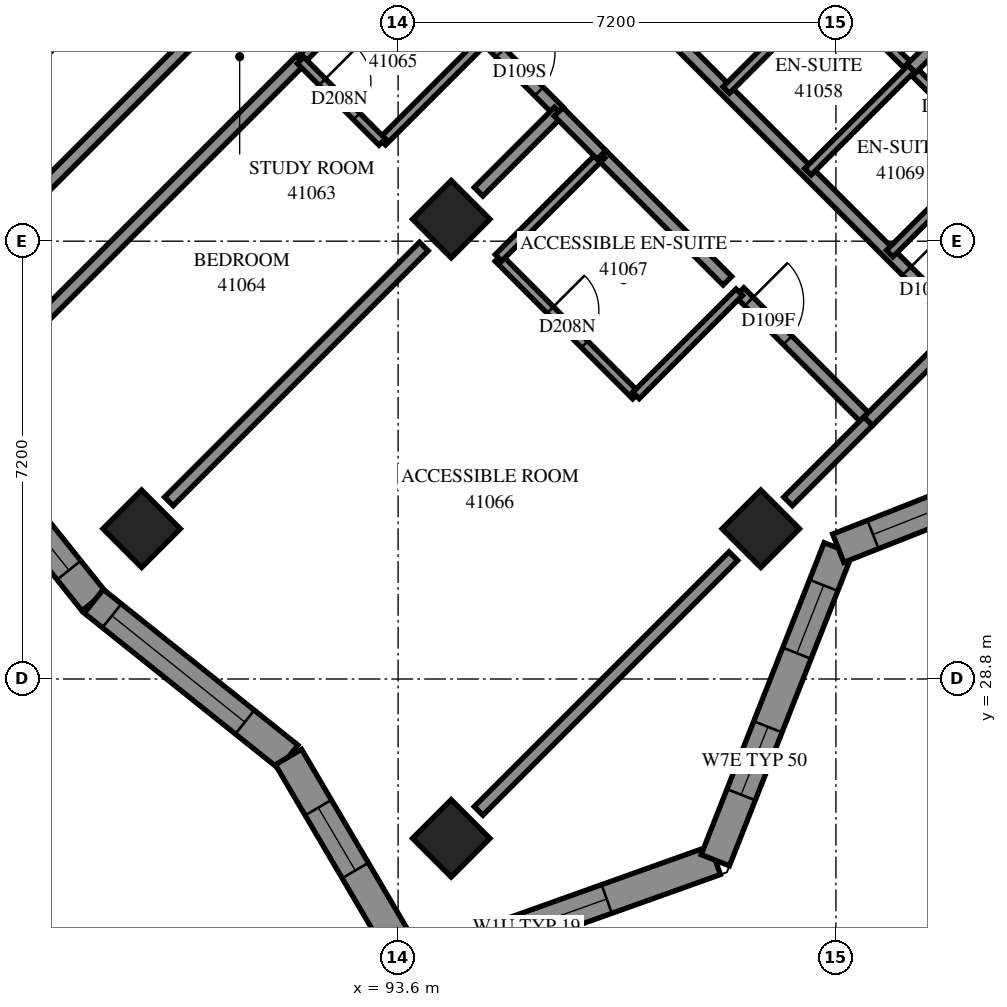
"""IFC4 building model, lengths in metres.
Left out: names, types, materials, properties, quantities, classifications, styles, units other than length and angle.
Written with IfcOpenShell. Run it as: python <this file> out.ifc"""

import sys

from ifc_helpers import new_model, si_unit, direction, frame, frame_2d, origin, origin_2d, place, context, subcontext, project, spatial, polyline, rectangle, outline, extrude, element, fill, save


model = new_model("IFC4")
c1 = context("Model", 3, precision=1e-05, world=origin(), true_north=direction((0.0, 1.0)))
c2 = subcontext(c1, "Body", "Model", "MODEL_VIEW")
j1 = project(units=[si_unit("LENGTHUNIT", "METRE"), si_unit("PLANEANGLEUNIT", "RADIAN")], contexts=[c1])
p1 = place(None, origin())
s1 = spatial("IfcSite", under=j1, at=p1, CompositionType="ELEMENT")
p2 = place(p1, origin())
s2 = spatial("IfcBuilding", under=s1, at=p2, CompositionType="ELEMENT")
p3 = place(p2, frame((0.0, 0.0, 152.4)))
s3 = spatial("IfcBuildingStorey", under=s2, at=p3, CompositionType="ELEMENT", Elevation=152.4)
for number, where, z_axis, x_axis in (
    (1, (94.474, 36.362, 0.0), (0.0, 0.0, 1.0), (0.707, -0.707, 0.0)),
    (2, (89.382, 31.271, 0.0), (0.0, 0.0, 1.0), (0.707, -0.707, 0.0)),
    (3, (99.565, 31.271, 0.0), (0.0, 0.0, 1.0), (0.707, -0.707, 0.0)),
    (4, (94.474, 26.18, 0.0), (0.0, 0.0, 1.0), (0.707, -0.707, 0.0)),
):
    element("IfcColumn", number, at=place(p3, frame(where, z_axis=z_axis, x_axis=x_axis)), inside=s3, PredefinedType="COLUMN", context=c2, shape_type="SweptSolid", body=[
        extrude(rectangle(XDim=0.9, YDim=0.9, at=origin_2d()), origin(), (0.0, 0.0, 1.0), 3.1),
    ])
p4 = place(p3, frame((87.049, 38.695, -0.3), z_axis=(0.0, 0.0, 1.0), x_axis=(0.7071067812, 0.7071067812, 0.0)))
e5 = element("IfcWall", 5, at=p4, inside=s3, PredefinedType="SHEAR", context=c2, shape_type="SweptSolid", body=[
    extrude(rectangle(XDim=14.4, YDim=0.6, at=frame_2d((7.2, 0.0))), origin(), (0.0, 0.0, 1.0), 2.7),
])
p5 = place(p4, frame((4.55, 0.0, 0.3)))
e6 = element("IfcOpeningElement", 6, at=p5, cuts=e5, PredefinedType="OPENING", context=c2, shape_type="SweptSolid", body=[
    extrude(rectangle(XDim=1.1, YDim=2.1, at=frame_2d((0.55, 1.05))), frame((0.0, 0.31, 0.0), z_axis=(0.0, -1.0, 0.0), x_axis=(1.0, 0.0, 0.0)), (0.0, 0.0, 1.0), 0.62),
])
p6 = place(p4, frame((11.35, 0.0, 0.3)))
e7 = element("IfcOpeningElement", 7, at=p6, cuts=e5, PredefinedType="OPENING", context=c2, shape_type="SweptSolid", body=[
    extrude(rectangle(XDim=1.1, YDim=2.1, at=frame_2d((0.55, 1.05))), frame((0.0, 0.31, 0.0), z_axis=(0.0, -1.0, 0.0), x_axis=(1.0, 0.0, 0.0)), (0.0, 0.0, 1.0), 0.62),
])
p7 = place(p3, frame((93.841, 24.044, 0.0), z_axis=(0.0, 0.0, 1.0), x_axis=(0.9418395195, 0.3360629696, 0.0)))
e8 = element("IfcWall", 8, at=p7, inside=s3, PredefinedType="SOLIDWALL", context=c2, shape_type="SweptSolid", body=[
    extrude(outline(polyline([(-0.207, -0.25), (5.396, -0.25), (5.169, 0.25), (0.207, 0.25), (-0.207, -0.25)])), origin(), (0.0, 0.0, 1.0), 3.1),
])
p8 = place(p7, frame((0.587, 0.0, 0.45)))
e9 = element("IfcOpeningElement", 9, at=p8, cuts=e8, PredefinedType="OPENING", context=c2, shape_type="SweptSolid", body=[
    extrude(rectangle(XDim=2.8, YDim=2.5, at=frame_2d((1.4, 1.25))), frame((0.0, 0.26, 0.0), z_axis=(0.0, -1.0, 0.0), x_axis=(1.0, 0.0, 0.0)), (0.0, 0.0, 1.0), 0.52),
])
p9 = place(p3, frame((98.816, 25.819, 0.0), z_axis=(0.0, 0.0, 1.0), x_axis=(0.3666966918, 0.9303405485, 0.0)))
e10 = element("IfcWall", 10, at=p9, inside=s3, PredefinedType="SOLIDWALL", context=c2, shape_type="SweptSolid", body=[
    extrude(outline(polyline([(-0.114, -0.25), (5.407, -0.25), (5.624, 0.25), (0.114, 0.25), (-0.114, -0.25)])), origin(), (0.0, 0.0, 1.0), 3.1),
])
p10 = place(p9, frame((1.159, 0.0, 0.45)))
e11 = element("IfcOpeningElement", 11, at=p10, cuts=e10, PredefinedType="OPENING", context=c2, shape_type="SweptSolid", body=[
    extrude(rectangle(XDim=1.2, YDim=2.5, at=frame_2d((0.6, 1.25))), frame((0.0, 0.26, 0.0), z_axis=(0.0, -1.0, 0.0), x_axis=(1.0, 0.0, 0.0)), (0.0, 0.0, 1.0), 0.52),
])
p11 = place(p9, frame((3.659, 0.0, 0.45)))
e12 = element("IfcOpeningElement", 12, at=p11, cuts=e10, PredefinedType="OPENING", context=c2, shape_type="SweptSolid", body=[
    extrude(rectangle(XDim=1.2, YDim=2.5, at=frame_2d((0.6, 1.25))), frame((0.0, 0.26, 0.0), z_axis=(0.0, -1.0, 0.0), x_axis=(1.0, 0.0, 0.0)), (0.0, 0.0, 1.0), 0.52),
])
p12 = place(p3, frame((100.839, 30.95, 0.0), z_axis=(0.0, 0.0, 1.0), x_axis=(0.9303343627, 0.3667123852, 0.0)))
e13 = element("IfcWall", 13, at=p12, inside=s3, PredefinedType="SOLIDWALL", context=c2, shape_type="SweptSolid", body=[
    extrude(outline(polyline([(0.109, -0.25), (5.629, -0.25), (5.402, 0.25), (-0.109, 0.25), (0.109, -0.25)])), origin(), (0.0, 0.0, 1.0), 3.1),
])
p13 = place(p12, frame((0.614, 0.0, 0.45)))
e14 = element("IfcOpeningElement", 14, at=p13, cuts=e13, PredefinedType="OPENING", context=c2, shape_type="SweptSolid", body=[
    extrude(rectangle(XDim=2.8, YDim=2.5, at=frame_2d((1.4, 1.25))), frame((0.0, 0.26, 0.0), z_axis=(0.0, -1.0, 0.0), x_axis=(1.0, 0.0, 0.0)), (0.0, 0.0, 1.0), 0.52),
])
p14 = place(p3, frame((86.046, 33.265, 0.0), z_axis=(0.0, 0.0, 1.0), x_axis=(0.6246412623, -0.7809118346, 0.0)))
e15 = element("IfcWall", 15, at=p14, inside=s3, PredefinedType="SOLIDWALL", context=c2, shape_type="SweptSolid", body=[
    extrude(outline(polyline([(0.028, -0.25), (4.109, -0.25), (4.054, 0.25), (-0.028, 0.25), (0.028, -0.25)])), origin(), (0.0, 0.0, 1.0), 3.1),
])
p15 = place(p14, frame((0.627, 0.0, 0.45)))
e16 = element("IfcOpeningElement", 16, at=p15, cuts=e15, PredefinedType="OPENING", context=c2, shape_type="SweptSolid", body=[
    extrude(rectangle(XDim=2.8, YDim=2.5, at=frame_2d((1.4, 1.25))), frame((0.0, 0.26, 0.0), z_axis=(0.0, -1.0, 0.0), x_axis=(1.0, 0.0, 0.0)), (0.0, 0.0, 1.0), 0.52),
])
p16 = place(p3, frame((88.596, 30.078, 0.0), z_axis=(0.0, 0.0, 1.0), x_axis=(0.7809068844, -0.6246474509, 0.0)))
e17 = element("IfcWall", 17, at=p16, inside=s3, PredefinedType="SOLIDWALL", context=c2, shape_type="SweptSolid", body=[
    extrude(outline(polyline([(-0.028, -0.25), (4.054, -0.25), (4.146, 0.25), (0.028, 0.25), (-0.028, -0.25)])), origin(), (0.0, 0.0, 1.0), 3.1),
])
p17 = place(p16, frame((0.381, 0.0, 0.45)))
e18 = element("IfcOpeningElement", 18, at=p17, cuts=e17, PredefinedType="OPENING", context=c2, shape_type="SweptSolid", body=[
    extrude(rectangle(XDim=2.8, YDim=2.5, at=frame_2d((1.4, 1.25))), frame((0.0, 0.26, 0.0), z_axis=(0.0, -1.0, 0.0), x_axis=(1.0, 0.0, 0.0)), (0.0, 0.0, 1.0), 0.52),
])
p18 = place(p3, frame((91.797, 27.517, 0.0), z_axis=(0.0, 0.0, 1.0), x_axis=(0.5071491729, -0.8618582925, 0.0)))
e19 = element("IfcWall", 19, at=p18, inside=s3, PredefinedType="SOLIDWALL", context=c2, shape_type="SweptSolid", body=[
    extrude(outline(polyline([(0.046, -0.25), (4.236, -0.25), (3.823, 0.25), (-0.046, 0.25), (0.046, -0.25)])), origin(), (0.0, 0.0, 1.0), 3.1),
])
p19 = place(p18, frame((0.966, 0.0, 0.45)))
e20 = element("IfcOpeningElement", 20, at=p19, cuts=e19, PredefinedType="OPENING", context=c2, shape_type="SweptSolid", body=[
    extrude(rectangle(XDim=1.2, YDim=2.5, at=frame_2d((0.6, 1.25))), frame((0.0, 0.26, 0.0), z_axis=(0.0, -1.0, 0.0), x_axis=(1.0, 0.0, 0.0)), (0.0, 0.0, 1.0), 0.52),
])
p20 = place(p3, frame((94.189, 43.287, 0.0), z_axis=(0.0, 0.0, 1.0), x_axis=(0.7071067812, -0.7071067812, 0.0)))
e21 = element("IfcWall", 21, at=p20, inside=s3, PredefinedType="PARTITIONING", context=c2, shape_type="SweptSolid", body=[
    extrude(rectangle(XDim=12.298, YDim=0.2, at=frame_2d((6.149, 0.0))), origin(), (0.0, 0.0, 1.0), 3.1),
])
p21 = place(p20, frame((3.755, 0.0, 0.0)))
e22 = element("IfcOpeningElement", 22, at=p21, cuts=e21, PredefinedType="OPENING", context=c2, shape_type="SweptSolid", body=[
    extrude(rectangle(XDim=0.9, YDim=2.1, at=frame_2d((0.45, 1.05))), frame((0.0, 0.11, 0.0), z_axis=(0.0, -1.0, 0.0), x_axis=(1.0, 0.0, 0.0)), (0.0, 0.0, 1.0), 0.22),
])
p22 = place(p20, frame((10.998, 0.0, 0.0)))
e23 = element("IfcOpeningElement", 23, at=p22, cuts=e21, PredefinedType="OPENING", context=c2, shape_type="SweptSolid", body=[
    extrude(rectangle(XDim=0.9, YDim=2.1, at=frame_2d((0.45, 1.05))), frame((0.0, 0.11, 0.0), z_axis=(0.0, -1.0, 0.0), x_axis=(1.0, 0.0, 0.0)), (0.0, 0.0, 1.0), 0.22),
])
p23 = place(p3, frame((86.836, 35.938, 0.0), z_axis=(0.0, 0.0, 1.0), x_axis=(0.7071067812, 0.7071067812, 0.0)))
e24 = element("IfcWall", 24, at=p23, inside=s3, PredefinedType="PARTITIONING", context=c2, shape_type="SweptSolid", body=[
    extrude(rectangle(XDim=8.2, YDim=0.2, at=frame_2d((4.1, 0.0))), origin(), (0.0, 0.0, 1.0), 3.1),
])
p24 = place(p3, frame((86.33, 33.311, 0.0), z_axis=(0.0, 0.0, 1.0), x_axis=(0.707100543, 0.7071130194, 0.0)))
e25 = element("IfcWall", 25, at=p24, inside=s3, PredefinedType="PARTITIONING", context=c2, shape_type="SweptSolid", body=[
    extrude(rectangle(XDim=8.015, YDim=0.2, at=frame_2d((4.008, 0.0))), origin(), (0.0, 0.0, 1.0), 3.1),
])
p25 = place(p3, frame((89.831, 31.721, 0.0), z_axis=(0.0, 0.0, 1.0), x_axis=(0.7071067812, 0.7071067812, 0.0)))
e26 = element("IfcWall", 26, at=p25, inside=s3, PredefinedType="PARTITIONING", context=c2, shape_type="SweptSolid", body=[
    extrude(rectangle(XDim=5.928, YDim=0.2, at=frame_2d((2.964, 0.0))), origin(), (0.0, 0.0, 1.0), 3.1),
])
p26 = place(p3, frame((94.923, 26.631, 0.0), z_axis=(0.0, 0.0, 1.0), x_axis=(0.7071067812, 0.7071067812, 0.0)))
e27 = element("IfcWall", 27, at=p26, inside=s3, PredefinedType="PARTITIONING", context=c2, shape_type="SweptSolid", body=[
    extrude(rectangle(XDim=5.926, YDim=0.2, at=frame_2d((2.963, 0.0))), origin(), (0.0, 0.0, 1.0), 2.6),
])
p27 = place(p3, frame((92.639, 41.739, 0.0), z_axis=(0.0, 0.0, 1.0), x_axis=(0.7071067812, -0.7071067812, 0.0)))
e28 = element("IfcWall", 28, at=p27, inside=s3, PredefinedType="PARTITIONING", context=c2, shape_type="SweptSolid", body=[
    extrude(rectangle(XDim=5.1, YDim=0.2, at=frame_2d((2.55, 0.0))), origin(), (0.0, 0.0, 1.0), 3.1),
])
p28 = place(p27, frame((0.123, 0.0, 0.0)))
e29 = element("IfcOpeningElement", 29, at=p28, cuts=e28, PredefinedType="OPENING", context=c2, shape_type="SweptSolid", body=[
    extrude(rectangle(XDim=1.0, YDim=2.1, at=frame_2d((0.5, 1.05))), frame((0.0, 0.11, 0.0), z_axis=(0.0, -1.0, 0.0), x_axis=(1.0, 0.0, 0.0)), (0.0, 0.0, 1.0), 0.22),
])
p29 = place(p27, frame((3.734, 0.0, 0.0)))
e30 = element("IfcOpeningElement", 30, at=p29, cuts=e28, PredefinedType="OPENING", context=c2, shape_type="SweptSolid", body=[
    extrude(rectangle(XDim=0.9, YDim=2.1, at=frame_2d((0.45, 1.05))), frame((0.0, 0.11, 0.0), z_axis=(0.0, -1.0, 0.0), x_axis=(1.0, 0.0, 0.0)), (0.0, 0.0, 1.0), 0.22),
])
p30 = place(p3, frame((100.694, 40.178, 0.0), z_axis=(0.0, 0.0, 1.0), x_axis=(0.7076329021, -0.7065802685, 0.0)))
e31 = element("IfcWall", 31, at=p30, inside=s3, PredefinedType="PARTITIONING", context=c2, shape_type="SweptSolid", body=[
    extrude(rectangle(XDim=3.8, YDim=0.15, at=frame_2d((1.9, 0.0))), origin(), (0.0, 0.0, 1.0), 3.1),
])
p31 = place(p30, frame((0.598, 0.0, 0.0)))
e32 = element("IfcOpeningElement", 32, at=p31, cuts=e31, PredefinedType="OPENING", context=c2, shape_type="SweptSolid", body=[
    extrude(rectangle(XDim=0.8, YDim=2.1, at=frame_2d((0.4, 1.05))), frame((0.0, 0.085, 0.0), z_axis=(0.0, -1.0, 0.0), x_axis=(1.0, 0.0, 0.0)), (0.0, 0.0, 1.0), 0.17),
])
p32 = place(p30, frame((2.405, 0.0, 0.0)))
e33 = element("IfcOpeningElement", 33, at=p32, cuts=e31, PredefinedType="OPENING", context=c2, shape_type="SweptSolid", body=[
    extrude(rectangle(XDim=0.8, YDim=2.1, at=frame_2d((0.4, 1.05))), frame((0.0, 0.085, 0.0), z_axis=(0.0, -1.0, 0.0), x_axis=(1.0, 0.0, 0.0)), (0.0, 0.0, 1.0), 0.17),
])
p33 = place(p3, frame((95.249, 35.723, 0.0), z_axis=(0.0, 0.0, 1.0), x_axis=(0.7067942478, -0.7074191764, 0.0)))
e34 = element("IfcWall", 34, at=p33, inside=s3, PredefinedType="PARTITIONING", context=c2, shape_type="SweptSolid", body=[
    extrude(rectangle(XDim=3.2, YDim=0.15, at=frame_2d((1.6, 0.0))), origin(), (0.0, 0.0, 1.0), 3.1),
])
p34 = place(p33, frame((1.206, 0.0, 0.0)))
e35 = element("IfcOpeningElement", 35, at=p34, cuts=e34, PredefinedType="OPENING", context=c2, shape_type="SweptSolid", body=[
    extrude(rectangle(XDim=0.8, YDim=2.1, at=frame_2d((0.4, 1.05))), frame((0.0, 0.085, 0.0), z_axis=(0.0, -1.0, 0.0), x_axis=(1.0, 0.0, 0.0)), (0.0, 0.0, 1.0), 0.17),
])
p35 = place(p3, frame((102.04, 38.838, 0.0), z_axis=(0.0, 0.0, 1.0), x_axis=(0.7071067812, 0.7071067812, 0.0)))
e36 = element("IfcWall", 36, at=p35, inside=s3, PredefinedType="PARTITIONING", context=c2, shape_type="SweptSolid", body=[
    extrude(rectangle(XDim=3.199, YDim=0.2, at=frame_2d((1.599, 0.0))), origin(), (0.0, 0.0, 1.0), 3.1),
])
p36 = place(p3, frame((99.214, 35.162, 0.0), z_axis=(0.0, 0.0, 1.0), x_axis=(0.706773319, -0.7074400862, 0.0)))
e37 = element("IfcWall", 37, at=p36, inside=s3, PredefinedType="PARTITIONING", context=c2, shape_type="SweptSolid", body=[
    extrude(rectangle(XDim=2.999, YDim=0.2, at=frame_2d((1.5, 0.0))), origin(), (0.0, 0.0, 1.0), 3.1),
])
p37 = place(p36, frame((0.22, 0.0, 0.0)))
e38 = element("IfcOpeningElement", 38, at=p37, cuts=e37, PredefinedType="OPENING", context=c2, shape_type="SweptSolid", body=[
    extrude(rectangle(XDim=0.9, YDim=2.1, at=frame_2d((0.45, 1.05))), frame((0.0, 0.11, 0.0), z_axis=(0.0, -1.0, 0.0), x_axis=(1.0, 0.0, 0.0)), (0.0, 0.0, 1.0), 0.22),
])
p38 = place(p3, frame((96.945, 37.419, 0.0), z_axis=(0.0, 0.0, 1.0), x_axis=(0.7071067812, -0.7071067812, 0.0)))
e39 = element("IfcWall", 39, at=p38, inside=s3, PredefinedType="PARTITIONING", context=c2, shape_type="SweptSolid", body=[
    extrude(rectangle(XDim=2.927, YDim=0.2, at=frame_2d((1.464, 0.0))), origin(), (0.0, 0.0, 1.0), 3.1),
])
for number, where, z_axis, x_axis in (
    (40, (97.513, 33.463, 0.0), (0.0, 0.0, 1.0), (0.707, 0.707, 0.0)),
    (41, (93.341, 37.635, 0.0), (0.0, 0.0, 1.0), (0.707, 0.707, 0.0)),
    (42, (101.685, 35.797, 0.0), (0.0, 0.0, 1.0), (0.707, 0.707, 0.0)),
    (43, (91.997, 38.979, 0.0), (0.0, 0.0, 1.0), (0.707, 0.707, 0.0)),
):
    element("IfcWall", number, at=place(p3, frame(where, z_axis=z_axis, x_axis=x_axis)), inside=s3, PredefinedType="PARTITIONING", context=c2, shape_type="SweptSolid", body=[
        extrude(rectangle(XDim=2.401, YDim=0.15, at=frame_2d((1.201, 0.0))), origin(), (0.0, 0.0, 1.0), 3.1),
    ])
for number, where, z_axis, x_axis in (
    (44, (100.34, 37.142, 0.0), (0.0, 0.0, 1.0), (0.708, 0.707, 0.0)),
    (45, (98.996, 38.486, 0.0), (0.0, 0.0, 1.0), (0.708, 0.707, 0.0)),
):
    element("IfcWall", number, at=place(p3, frame(where, z_axis=z_axis, x_axis=x_axis)), inside=s3, PredefinedType="PARTITIONING", context=c2, shape_type="SweptSolid", body=[
        extrude(rectangle(XDim=2.4, YDim=0.15, at=frame_2d((1.2, 0.0))), origin(), (0.0, 0.0, 1.0), 3.1),
    ])
p39 = place(p3, frame((95.251, 35.727, 0.0), z_axis=(0.0, 0.0, 1.0), x_axis=(0.7071067812, 0.7071067812, 0.0)))
e46 = element("IfcWall", 46, at=p39, inside=s3, PredefinedType="PARTITIONING", context=c2, shape_type="SweptSolid", body=[
    extrude(rectangle(XDim=2.398, YDim=0.15, at=frame_2d((1.199, 0.0))), origin(), (0.0, 0.0, 1.0), 3.1),
])
p40 = place(p3, frame((101.331, 33.039, 0.0), z_axis=(0.0, 0.0, 1.0), x_axis=(0.7071067812, 0.7071067812, 0.0)))
e47 = element("IfcWall", 47, at=p40, inside=s3, PredefinedType="PARTITIONING", context=c2, shape_type="SweptSolid", body=[
    extrude(rectangle(XDim=2.2, YDim=0.2, at=frame_2d((1.1, 0.0))), origin(), (0.0, 0.0, 1.0), 2.6),
])
p41 = place(p3, frame((91.995, 38.975, 0.0), z_axis=(0.0, 0.0, 1.0), x_axis=(0.7071067812, -0.7071067812, 0.0)))
e48 = element("IfcWall", 48, at=p41, inside=s3, PredefinedType="PARTITIONING", context=c2, shape_type="SweptSolid", body=[
    extrude(rectangle(XDim=1.901, YDim=0.15, at=frame_2d((0.95, 0.0))), origin(), (0.0, 0.0, 1.0), 3.1),
])
p42 = place(p41, frame((0.506, 0.0, 0.0)))
e49 = element("IfcOpeningElement", 49, at=p42, cuts=e48, PredefinedType="OPENING", context=c2, shape_type="SweptSolid", body=[
    extrude(rectangle(XDim=0.8, YDim=2.1, at=frame_2d((0.4, 1.05))), frame((0.0, 0.085, 0.0), z_axis=(0.0, -1.0, 0.0), x_axis=(1.0, 0.0, 0.0)), (0.0, 0.0, 1.0), 0.17),
])
p43 = place(p3, frame((94.923, 36.813, 0.0), z_axis=(0.0, 0.0, 1.0), x_axis=(0.7071067812, 0.7071067812, 0.0)))
e50 = element("IfcWall", 50, at=p43, inside=s3, PredefinedType="PARTITIONING", context=c2, shape_type="SweptSolid", body=[
    extrude(rectangle(XDim=1.864, YDim=0.2, at=frame_2d((0.932, 0.0))), origin(), (0.0, 0.0, 1.0), 3.1),
])
p44 = place(p3, frame((100.013, 31.721, 0.0), z_axis=(0.0, 0.0, 1.0), x_axis=(0.7071067812, 0.7071067812, 0.0)))
e51 = element("IfcWall", 51, at=p44, inside=s3, PredefinedType="PARTITIONING", context=c2, shape_type="SweptSolid", body=[
    extrude(rectangle(XDim=1.864, YDim=0.2, at=frame_2d((0.932, 0.0))), origin(), (0.0, 0.0, 1.0), 2.6),
])
p45 = place(p3, frame((96.24, 38.128, 0.0), z_axis=(0.0, 0.0, 1.0), x_axis=(0.7061059238, -0.7081062239, 0.0)))
e52 = element("IfcWall", 52, at=p45, inside=s3, PredefinedType="PARTITIONING", context=c2, shape_type="SweptSolid", body=[
    extrude(rectangle(XDim=1.0, YDim=0.2, at=frame_2d((0.5, 0.0))), origin(), (0.0, 0.0, 1.0), 3.1),
])
p46 = place(p8, origin())
e53 = element("IfcWindow", 53, at=p46, inside=s3, PartitioningType="SINGLE_PANEL", PredefinedType="WINDOW", context=c2, shape_type="SweptSolid", body=[
    extrude(rectangle(XDim=2.8, YDim=2.5, at=frame_2d((1.4, 1.25))), frame((0.0, 0.18, 0.0), z_axis=(0.0, -1.0, 0.0), x_axis=(1.0, 0.0, 0.0)), (0.0, 0.0, 1.0), 0.06),
])
fill(e9, e53)
p47 = place(p10, origin())
e54 = element("IfcWindow", 54, at=p47, inside=s3, PartitioningType="SINGLE_PANEL", PredefinedType="WINDOW", context=c2, shape_type="SweptSolid", body=[
    extrude(rectangle(XDim=1.2, YDim=2.5, at=frame_2d((0.6, 1.25))), frame((0.0, 0.18, 0.0), z_axis=(0.0, -1.0, 0.0), x_axis=(1.0, 0.0, 0.0)), (0.0, 0.0, 1.0), 0.06),
])
fill(e11, e54)
p48 = place(p11, origin())
e55 = element("IfcWindow", 55, at=p48, inside=s3, PartitioningType="SINGLE_PANEL", PredefinedType="WINDOW", context=c2, shape_type="SweptSolid", body=[
    extrude(rectangle(XDim=1.2, YDim=2.5, at=frame_2d((0.6, 1.25))), frame((0.0, 0.18, 0.0), z_axis=(0.0, -1.0, 0.0), x_axis=(1.0, 0.0, 0.0)), (0.0, 0.0, 1.0), 0.06),
])
fill(e12, e55)
p49 = place(p13, origin())
e56 = element("IfcWindow", 56, at=p49, inside=s3, PartitioningType="SINGLE_PANEL", PredefinedType="WINDOW", context=c2, shape_type="SweptSolid", body=[
    extrude(rectangle(XDim=2.8, YDim=2.5, at=frame_2d((1.4, 1.25))), frame((0.0, 0.18, 0.0), z_axis=(0.0, -1.0, 0.0), x_axis=(1.0, 0.0, 0.0)), (0.0, 0.0, 1.0), 0.06),
])
fill(e14, e56)
p50 = place(p15, origin())
e57 = element("IfcWindow", 57, at=p50, inside=s3, PartitioningType="SINGLE_PANEL", PredefinedType="WINDOW", context=c2, shape_type="SweptSolid", body=[
    extrude(rectangle(XDim=2.8, YDim=2.5, at=frame_2d((1.4, 1.25))), frame((0.0, 0.18, 0.0), z_axis=(0.0, -1.0, 0.0), x_axis=(1.0, 0.0, 0.0)), (0.0, 0.0, 1.0), 0.06),
])
fill(e16, e57)
p51 = place(p17, origin())
e58 = element("IfcWindow", 58, at=p51, inside=s3, PartitioningType="SINGLE_PANEL", PredefinedType="WINDOW", context=c2, shape_type="SweptSolid", body=[
    extrude(rectangle(XDim=2.8, YDim=2.5, at=frame_2d((1.4, 1.25))), frame((0.0, 0.18, 0.0), z_axis=(0.0, -1.0, 0.0), x_axis=(1.0, 0.0, 0.0)), (0.0, 0.0, 1.0), 0.06),
])
fill(e18, e58)
p52 = place(p19, origin())
e59 = element("IfcWindow", 59, at=p52, inside=s3, PartitioningType="SINGLE_PANEL", PredefinedType="WINDOW", context=c2, shape_type="SweptSolid", body=[
    extrude(rectangle(XDim=1.2, YDim=2.5, at=frame_2d((0.6, 1.25))), frame((0.0, 0.18, 0.0), z_axis=(0.0, -1.0, 0.0), x_axis=(1.0, 0.0, 0.0)), (0.0, 0.0, 1.0), 0.06),
])
fill(e20, e59)
p53 = place(p29, origin())
e60 = element("IfcDoor", 60, at=p53, inside=s3, OperationType="SINGLE_SWING_LEFT", PredefinedType="DOOR", context=c2, shape_type="SweptSolid", body=[
    extrude(rectangle(XDim=0.9, YDim=2.1, at=frame_2d((0.45, 1.05))), frame((0.0, 0.025, 0.0), z_axis=(0.0, -1.0, 0.0), x_axis=(1.0, 0.0, 0.0)), (0.0, 0.0, 1.0), 0.05),
])
fill(e30, e60)
p54 = place(p42, origin())
e61 = element("IfcDoor", 61, at=p54, inside=s3, OperationType="SINGLE_SWING_RIGHT", PredefinedType="DOOR", context=c2, shape_type="SweptSolid", body=[
    extrude(rectangle(XDim=0.8, YDim=2.1, at=frame_2d((0.4, 1.05))), frame((0.0, 0.025, 0.0), z_axis=(0.0, -1.0, 0.0), x_axis=(1.0, 0.0, 0.0)), (0.0, 0.0, 1.0), 0.05),
])
fill(e49, e61)
p55 = place(p37, origin())
e62 = element("IfcDoor", 62, at=p55, inside=s3, OperationType="SINGLE_SWING_RIGHT", PredefinedType="DOOR", context=c2, shape_type="SweptSolid", body=[
    extrude(rectangle(XDim=0.9, YDim=2.1, at=frame_2d((0.45, 1.05))), frame((0.0, 0.025, 0.0), z_axis=(0.0, -1.0, 0.0), x_axis=(1.0, 0.0, 0.0)), (0.0, 0.0, 1.0), 0.05),
])
fill(e38, e62)
p56 = place(p34, origin())
e63 = element("IfcDoor", 63, at=p56, inside=s3, OperationType="SINGLE_SWING_RIGHT", PredefinedType="DOOR", context=c2, shape_type="SweptSolid", body=[
    extrude(rectangle(XDim=0.8, YDim=2.1, at=frame_2d((0.4, 1.05))), frame((0.0, 0.025, 0.0), z_axis=(0.0, -1.0, 0.0), x_axis=(1.0, 0.0, 0.0)), (0.0, 0.0, 1.0), 0.05),
])
fill(e35, e63)
p57 = place(p22, origin())
e64 = element("IfcDoor", 64, at=p57, inside=s3, OperationType="SINGLE_SWING_RIGHT", PredefinedType="DOOR", context=c2, shape_type="SweptSolid", body=[
    extrude(rectangle(XDim=0.9, YDim=2.1, at=frame_2d((0.45, 1.05))), frame((0.0, 0.025, 0.0), z_axis=(0.0, -1.0, 0.0), x_axis=(1.0, 0.0, 0.0)), (0.0, 0.0, 1.0), 0.05),
])
fill(e23, e64)
save(model, sys.argv[1])
